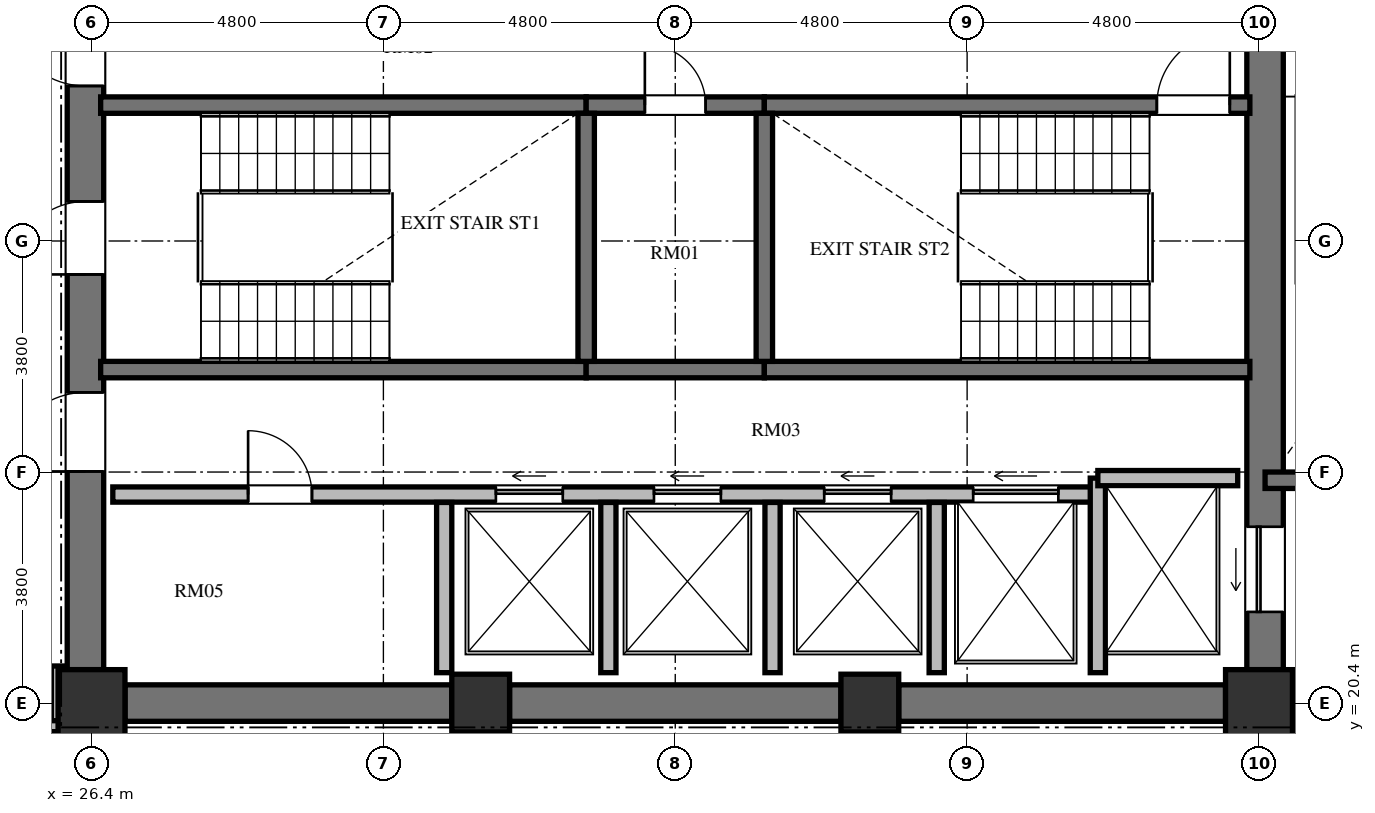
"""IFC4 building model, lengths in metres.
Left out: names, types, materials, properties, quantities, classifications, styles, units other than length and angle.
Written with IfcOpenShell. Run it as: python <this file> out.ifc"""

import sys

from ifc_helpers import new_model, si_unit, direction, frame, frame_2d, origin, origin_2d, place, context, subcontext, project, spatial, rectangle, extrude, element, fill, save


model = new_model("IFC4")
c1 = context("Model", 3, precision=1e-05, world=origin(), true_north=direction((0.0, 1.0)))
c2 = subcontext(c1, "Body", "Model", "MODEL_VIEW")
j1 = project(units=[si_unit("LENGTHUNIT", "METRE"), si_unit("PLANEANGLEUNIT", "RADIAN")], contexts=[c1])
p1 = place(None, origin())
s1 = spatial("IfcSite", under=j1, at=p1, CompositionType="ELEMENT")
p2 = place(p1, origin())
s2 = spatial("IfcBuilding", under=s1, at=p2, CompositionType="ELEMENT")
p3 = place(p2, frame((0.0, 0.0, 167.472)))
s3 = spatial("IfcBuildingStorey", under=s2, at=p3, CompositionType="ELEMENT", Elevation=167.472)
p4 = place(p3, frame((26.4, 20.4, 0.0), z_axis=(0.0, 0.0, 1.0), x_axis=(1.0, 0.0, 0.0)))
e1 = element("IfcColumn", 1, at=p4, inside=s3, PredefinedType="COLUMN", context=c2, shape_type="SweptSolid", body=[
    extrude(rectangle(XDim=1.1, YDim=1.1, at=origin_2d()), origin(), (0.0, 0.0, 1.0), 3.648),
])
for number, where, z_axis, x_axis in (
    (2, (32.8, 20.4, 0.0), (0.0, 0.0, 1.0), (1.0, 0.0, 0.0)),
    (3, (39.2, 20.4, 0.0), (0.0, 0.0, 1.0), (1.0, 0.0, 0.0)),
):
    element("IfcColumn", number, at=place(p3, frame(where, z_axis=z_axis, x_axis=x_axis)), inside=s3, PredefinedType="COLUMN", context=c2, shape_type="SweptSolid", body=[
        extrude(rectangle(XDim=0.95, YDim=0.95, at=origin_2d()), origin(), (0.0, 0.0, 1.0), 3.648),
    ])
p5 = place(p3, frame((45.6, 20.4, 0.0), z_axis=(0.0, 0.0, 1.0), x_axis=(1.0, 0.0, 0.0)))
e4 = element("IfcColumn", 4, at=p5, inside=s3, PredefinedType="COLUMN", context=c2, shape_type="SweptSolid", body=[
    extrude(rectangle(XDim=1.1, YDim=1.1, at=origin_2d()), origin(), (0.0, 0.0, 1.0), 3.648),
])
p6 = place(p3, frame((26.3, 20.95, 0.0), z_axis=(0.0, 0.0, 1.0), x_axis=(0.0, 1.0, 0.0)))
e5 = element("IfcWall", 5, at=p6, inside=s3, PredefinedType="SHEAR", context=c2, shape_type="SweptSolid", body=[
    extrude(rectangle(XDim=14.1, YDim=0.6, at=frame_2d((7.05, 0.0))), origin(), (0.0, 0.0, 1.0), 3.648),
])
p7 = place(p6, frame((6.5, 0.0, 0.0)))
e6 = element("IfcOpeningElement", 6, at=p7, cuts=e5, PredefinedType="OPENING", context=c2, shape_type="SweptSolid", body=[
    extrude(rectangle(XDim=1.2, YDim=2.15, at=frame_2d((0.6, 1.075))), frame((0.0, 0.31, 0.0), z_axis=(0.0, -1.0, 0.0), x_axis=(1.0, 0.0, 0.0)), (0.0, 0.0, 1.0), 0.62),
])
p8 = place(p6, frame((9.6, 0.0, 0.0)))
e7 = element("IfcOpeningElement", 7, at=p8, cuts=e5, PredefinedType="OPENING", context=c2, shape_type="SweptSolid", body=[
    extrude(rectangle(XDim=1.3, YDim=2.2, at=frame_2d((0.65, 1.1))), frame((0.0, 0.31, 0.0), z_axis=(0.0, -1.0, 0.0), x_axis=(1.0, 0.0, 0.0)), (0.0, 0.0, 1.0), 0.62),
])
p9 = place(p6, frame((3.26, 0.0, 0.0)))
e8 = element("IfcOpeningElement", 8, at=p9, cuts=e5, PredefinedType="OPENING", context=c2, shape_type="SweptSolid", body=[
    extrude(rectangle(XDim=1.3, YDim=2.2, at=frame_2d((0.65, 1.1))), frame((0.0, 0.31, 0.0), z_axis=(0.0, -1.0, 0.0), x_axis=(1.0, 0.0, 0.0)), (0.0, 0.0, 1.0), 0.62),
])
p10 = place(p3, frame((45.7, 20.95, 0.0), z_axis=(0.0, 0.0, 1.0), x_axis=(0.0, 1.0, 0.0)))
e9 = element("IfcWall", 9, at=p10, inside=s3, PredefinedType="SHEAR", context=c2, shape_type="SweptSolid", body=[
    extrude(rectangle(XDim=14.1, YDim=0.6, at=frame_2d((7.05, 0.0))), origin(), (0.0, 0.0, 1.0), 3.648),
])
p11 = place(p10, frame((11.75, 0.0, 0.0)))
e10 = element("IfcOpeningElement", 10, at=p11, cuts=e9, PredefinedType="OPENING", context=c2, shape_type="SweptSolid", body=[
    extrude(rectangle(XDim=1.4, YDim=2.3, at=frame_2d((0.7, 1.15))), frame((0.0, 0.31, 0.0), z_axis=(0.0, -1.0, 0.0), x_axis=(1.0, 0.0, 0.0)), (0.0, 0.0, 1.0), 0.62),
])
p12 = place(p10, frame((0.95, 0.0, 0.0)))
e11 = element("IfcOpeningElement", 11, at=p12, cuts=e9, PredefinedType="OPENING", context=c2, shape_type="SweptSolid", body=[
    extrude(rectangle(XDim=1.4, YDim=2.3, at=frame_2d((0.7, 1.15))), frame((0.0, 0.31, 0.0), z_axis=(0.0, -1.0, 0.0), x_axis=(1.0, 0.0, 0.0)), (0.0, 0.0, 1.0), 0.62),
])
p13 = place(p3, frame((26.95, 20.4, 0.0), z_axis=(0.0, 0.0, 1.0), x_axis=(1.0, 0.0, 0.0)))
e12 = element("IfcWall", 12, at=p13, inside=s3, PredefinedType="SHEAR", context=c2, shape_type="SweptSolid", body=[
    extrude(rectangle(XDim=5.375, YDim=0.6, at=frame_2d((2.688, 0.0))), origin(), (0.0, 0.0, 1.0), 3.648),
])
p14 = place(p3, frame((33.275, 20.4, 0.0), z_axis=(0.0, 0.0, 1.0), x_axis=(1.0, 0.0, 0.0)))
e13 = element("IfcWall", 13, at=p14, inside=s3, PredefinedType="SHEAR", context=c2, shape_type="SweptSolid", body=[
    extrude(rectangle(XDim=5.45, YDim=0.6, at=frame_2d((2.725, 0.0))), origin(), (0.0, 0.0, 1.0), 3.648),
])
p15 = place(p3, frame((39.675, 20.4, 0.0), z_axis=(0.0, 0.0, 1.0), x_axis=(1.0, 0.0, 0.0)))
e14 = element("IfcWall", 14, at=p15, inside=s3, PredefinedType="SHEAR", context=c2, shape_type="SweptSolid", body=[
    extrude(rectangle(XDim=5.375, YDim=0.6, at=frame_2d((2.688, 0.0))), origin(), (0.0, 0.0, 1.0), 3.648),
])
p16 = place(p3, frame((26.55, 30.235, 0.0), z_axis=(0.0, 0.0, 1.0), x_axis=(1.0, 0.0, 0.0)))
e15 = element("IfcWall", 15, at=p16, inside=s3, PredefinedType="SHEAR", context=c2, shape_type="SweptSolid", body=[
    extrude(rectangle(XDim=7.985, YDim=0.27, at=frame_2d((3.992, 0.0))), origin(), (0.0, 0.0, 1.0), 3.648),
])
p17 = place(p3, frame((34.535, 30.235, 0.0), z_axis=(0.0, 0.0, 1.0), x_axis=(1.0, 0.0, 0.0)))
e16 = element("IfcWall", 16, at=p17, inside=s3, PredefinedType="SHEAR", context=c2, shape_type="SweptSolid", body=[
    extrude(rectangle(XDim=2.93, YDim=0.27, at=frame_2d((1.465, 0.0))), origin(), (0.0, 0.0, 1.0), 3.648),
])
p18 = place(p17, frame((0.965, 0.0, 0.0)))
e17 = element("IfcOpeningElement", 17, at=p18, cuts=e16, PredefinedType="OPENING", context=c2, shape_type="SweptSolid", body=[
    extrude(rectangle(XDim=1.0, YDim=2.1, at=frame_2d((0.5, 1.05))), frame((0.0, 0.145, 0.0), z_axis=(0.0, -1.0, 0.0), x_axis=(1.0, 0.0, 0.0)), (0.0, 0.0, 1.0), 0.29),
])
p19 = place(p3, frame((37.465, 30.235, 0.0), z_axis=(0.0, 0.0, 1.0), x_axis=(1.0, 0.0, 0.0)))
e18 = element("IfcWall", 18, at=p19, inside=s3, PredefinedType="SHEAR", context=c2, shape_type="SweptSolid", body=[
    extrude(rectangle(XDim=7.985, YDim=0.27, at=frame_2d((3.992, 0.0))), origin(), (0.0, 0.0, 1.0), 3.648),
])
p20 = place(p19, frame((6.455, 0.0, 0.0)))
e19 = element("IfcOpeningElement", 19, at=p20, cuts=e18, PredefinedType="OPENING", context=c2, shape_type="SweptSolid", body=[
    extrude(rectangle(XDim=1.2, YDim=2.15, at=frame_2d((0.6, 1.075))), frame((0.0, 0.145, 0.0), z_axis=(0.0, -1.0, 0.0), x_axis=(1.0, 0.0, 0.0)), (0.0, 0.0, 1.0), 0.29),
])
p21 = place(p3, frame((26.55, 25.885, 0.0), z_axis=(0.0, 0.0, 1.0), x_axis=(1.0, 0.0, 0.0)))
e20 = element("IfcWall", 20, at=p21, inside=s3, PredefinedType="SHEAR", context=c2, shape_type="SweptSolid", body=[
    extrude(rectangle(XDim=7.985, YDim=0.27, at=frame_2d((3.992, 0.0))), origin(), (0.0, 0.0, 1.0), 3.648),
])
p22 = place(p3, frame((34.535, 25.885, 0.0), z_axis=(0.0, 0.0, 1.0), x_axis=(1.0, 0.0, 0.0)))
e21 = element("IfcWall", 21, at=p22, inside=s3, PredefinedType="SHEAR", context=c2, shape_type="SweptSolid", body=[
    extrude(rectangle(XDim=2.93, YDim=0.27, at=frame_2d((1.465, 0.0))), origin(), (0.0, 0.0, 1.0), 3.648),
])
p23 = place(p3, frame((37.465, 25.885, 0.0), z_axis=(0.0, 0.0, 1.0), x_axis=(1.0, 0.0, 0.0)))
e22 = element("IfcWall", 22, at=p23, inside=s3, PredefinedType="SHEAR", context=c2, shape_type="SweptSolid", body=[
    extrude(rectangle(XDim=7.985, YDim=0.27, at=frame_2d((3.992, 0.0))), origin(), (0.0, 0.0, 1.0), 3.648),
])
for number, where, z_axis, x_axis in (
    (23, (34.535, 26.02, 0.0), (0.0, 0.0, 1.0), (0.0, 1.0, 0.0)),
    (24, (37.465, 26.02, 0.0), (0.0, 0.0, 1.0), (0.0, 1.0, 0.0)),
):
    element("IfcWall", number, at=place(p3, frame(where, z_axis=z_axis, x_axis=x_axis)), inside=s3, PredefinedType="SHEAR", context=c2, shape_type="SweptSolid", body=[
        extrude(rectangle(XDim=4.08, YDim=0.27, at=frame_2d((2.04, 0.0))), origin(), (0.0, 0.0, 1.0), 3.648),
    ])
p24 = place(p3, frame((26.75, 23.83, 0.0), z_axis=(0.0, 0.0, 1.0), x_axis=(1.0, 0.0, 0.0)))
e25 = element("IfcWall", 25, at=p24, inside=s3, PredefinedType="SOLIDWALL", context=c2, shape_type="SweptSolid", body=[
    extrude(rectangle(XDim=16.2, YDim=0.25, at=frame_2d((8.1, 0.0))), origin(), (0.0, 0.0, 1.0), 3.428),
])
p25 = place(p24, frame((2.225, 0.0, 0.0)))
e26 = element("IfcOpeningElement", 26, at=p25, cuts=e25, PredefinedType="OPENING", context=c2, shape_type="SweptSolid", body=[
    extrude(rectangle(XDim=1.05, YDim=2.15, at=frame_2d((0.525, 1.075))), frame((0.0, 0.135, 0.0), z_axis=(0.0, -1.0, 0.0), x_axis=(1.0, 0.0, 0.0)), (0.0, 0.0, 1.0), 0.27),
])
p26 = place(p24, frame((6.3, 0.0, 0.0)))
e27 = element("IfcOpeningElement", 27, at=p26, cuts=e25, PredefinedType="OPENING", context=c2, shape_type="SweptSolid", body=[
    extrude(rectangle(XDim=1.1, YDim=2.2, at=frame_2d((0.55, 1.1))), frame((0.0, 0.135, 0.0), z_axis=(0.0, -1.0, 0.0), x_axis=(1.0, 0.0, 0.0)), (0.0, 0.0, 1.0), 0.27),
])
p27 = place(p24, frame((8.9, 0.0, 0.0)))
e28 = element("IfcOpeningElement", 28, at=p27, cuts=e25, PredefinedType="OPENING", context=c2, shape_type="SweptSolid", body=[
    extrude(rectangle(XDim=1.1, YDim=2.2, at=frame_2d((0.55, 1.1))), frame((0.0, 0.135, 0.0), z_axis=(0.0, -1.0, 0.0), x_axis=(1.0, 0.0, 0.0)), (0.0, 0.0, 1.0), 0.27),
])
p28 = place(p24, frame((11.7, 0.0, 0.0)))
e29 = element("IfcOpeningElement", 29, at=p28, cuts=e25, PredefinedType="OPENING", context=c2, shape_type="SweptSolid", body=[
    extrude(rectangle(XDim=1.1, YDim=2.2, at=frame_2d((0.55, 1.1))), frame((0.0, 0.135, 0.0), z_axis=(0.0, -1.0, 0.0), x_axis=(1.0, 0.0, 0.0)), (0.0, 0.0, 1.0), 0.27),
])
p29 = place(p24, frame((14.15, 0.0, 0.0)))
e30 = element("IfcOpeningElement", 30, at=p29, cuts=e25, PredefinedType="OPENING", context=c2, shape_type="SweptSolid", body=[
    extrude(rectangle(XDim=1.4, YDim=2.3, at=frame_2d((0.7, 1.15))), frame((0.0, 0.135, 0.0), z_axis=(0.0, -1.0, 0.0), x_axis=(1.0, 0.0, 0.0)), (0.0, 0.0, 1.0), 0.27),
])
p30 = place(p3, frame((42.95, 20.9, 0.0), z_axis=(0.0, 0.0, 1.0), x_axis=(0.0, 1.0, 0.0)))
e31 = element("IfcWall", 31, at=p30, inside=s3, PredefinedType="SOLIDWALL", context=c2, shape_type="SweptSolid", body=[
    extrude(rectangle(XDim=3.2, YDim=0.25, at=frame_2d((1.6, 0.0))), origin(), (0.0, 0.0, 1.0), 3.428),
])
p31 = place(p3, frame((42.95, 24.1, 0.0), z_axis=(0.0, 0.0, 1.0), x_axis=(1.0, 0.0, 0.0)))
e32 = element("IfcWall", 32, at=p31, inside=s3, PredefinedType="SOLIDWALL", context=c2, shape_type="SweptSolid", body=[
    extrude(rectangle(XDim=2.3, YDim=0.25, at=frame_2d((1.15, 0.0))), origin(), (0.0, 0.0, 1.0), 3.428),
])
for number, where, z_axis, x_axis in (
    (33, (32.2, 20.9, 0.0), (0.0, 0.0, 1.0), (0.0, 1.0, 0.0)),
    (34, (34.9, 20.9, 0.0), (0.0, 0.0, 1.0), (0.0, 1.0, 0.0)),
    (35, (37.6, 20.9, 0.0), (0.0, 0.0, 1.0), (0.0, 1.0, 0.0)),
    (36, (40.3, 20.9, 0.0), (0.0, 0.0, 1.0), (0.0, 1.0, 0.0)),
):
    element("IfcWall", number, at=place(p3, frame(where, z_axis=z_axis, x_axis=x_axis)), inside=s3, PredefinedType="SOLIDWALL", context=c2, shape_type="SweptSolid", body=[
        extrude(rectangle(XDim=2.8, YDim=0.25, at=frame_2d((1.4, 0.0))), origin(), (0.0, 0.0, 1.0), 3.428),
    ])
p32 = place(p3, frame((45.7, 24.065, 0.0), z_axis=(0.0, 0.0, 1.0), x_axis=(1.0, 0.0, 0.0)))
e37 = element("IfcWall", 37, at=p32, inside=s3, PredefinedType="SHEAR", context=c2, shape_type="SweptSolid", body=[
    extrude(rectangle(XDim=4.715, YDim=0.27, at=frame_2d((2.357, 0.0))), origin(), (0.0, 0.0, 1.0), 3.648),
])
p33 = place(p3, frame((45.7, 20.02, 0.0), z_axis=(0.0, 0.0, 1.0), x_axis=(1.0, 0.0, 0.0)))
e38 = element("IfcWall", 38, at=p33, inside=s3, PredefinedType="SOLIDWALL", context=c2, shape_type="SweptSolid", body=[
    extrude(rectangle(XDim=4.715, YDim=0.25, at=frame_2d((2.357, 0.0))), origin(), (0.0, 0.0, 1.0), 3.428),
])
p34 = place(p3, frame((25.83, 21.01, 0.0), z_axis=(0.0, 0.0, 1.0), x_axis=(0.0, -1.0, 0.0)))
e39 = element("IfcWall", 39, at=p34, inside=s3, PredefinedType="PARTITIONING", context=c2, shape_type="SweptSolid", body=[
    extrude(rectangle(XDim=1.03, YDim=0.18, at=frame_2d((0.515, 0.0))), origin(), (0.0, 0.0, 1.0), 3.428),
])
p35 = place(p3, frame((25.87, 20.02, 0.0), z_axis=(0.0, 0.0, 1.0), x_axis=(-1.0, 0.0, 0.0)))
e40 = element("IfcWall", 40, at=p35, inside=s3, PredefinedType="PARTITIONING", context=c2, shape_type="SweptSolid", body=[
    extrude(rectangle(XDim=2.56, YDim=0.18, at=frame_2d((1.28, 0.0))), origin(), (0.0, 0.0, 1.0), 3.428),
])
p36 = place(p7, origin())
e41 = element("IfcDoor", 41, at=p36, inside=s3, OperationType="SINGLE_SWING_LEFT", PredefinedType="DOOR", context=c2, shape_type="SweptSolid", body=[
    extrude(rectangle(XDim=1.2, YDim=2.15, at=frame_2d((0.6, 1.075))), frame((0.0, 0.025, 0.0), z_axis=(0.0, -1.0, 0.0), x_axis=(1.0, 0.0, 0.0)), (0.0, 0.0, 1.0), 0.05),
])
fill(e6, e41)
p37 = place(p20, origin())
e42 = element("IfcDoor", 42, at=p37, inside=s3, OperationType="SINGLE_SWING_RIGHT", PredefinedType="DOOR", context=c2, shape_type="SweptSolid", body=[
    extrude(rectangle(XDim=1.2, YDim=2.15, at=frame_2d((0.6, 1.075))), frame((0.0, 0.025, 0.0), z_axis=(0.0, -1.0, 0.0), x_axis=(1.0, 0.0, 0.0)), (0.0, 0.0, 1.0), 0.05),
])
fill(e19, e42)
p38 = place(p18, origin())
e43 = element("IfcDoor", 43, at=p38, inside=s3, OperationType="SINGLE_SWING_LEFT", PredefinedType="DOOR", context=c2, shape_type="SweptSolid", body=[
    extrude(rectangle(XDim=1.0, YDim=2.1, at=frame_2d((0.5, 1.05))), frame((0.0, 0.025, 0.0), z_axis=(0.0, -1.0, 0.0), x_axis=(1.0, 0.0, 0.0)), (0.0, 0.0, 1.0), 0.05),
])
fill(e17, e43)
p39 = place(p8, origin())
e44 = element("IfcDoor", 44, at=p39, inside=s3, OperationType="SINGLE_SWING_RIGHT", PredefinedType="DOOR", context=c2, shape_type="SweptSolid", body=[
    extrude(rectangle(XDim=1.3, YDim=2.2, at=frame_2d((0.65, 1.1))), frame((0.0, 0.025, 0.0), z_axis=(0.0, -1.0, 0.0), x_axis=(1.0, 0.0, 0.0)), (0.0, 0.0, 1.0), 0.05),
])
fill(e7, e44)
p40 = place(p9, origin())
e45 = element("IfcDoor", 45, at=p40, inside=s3, OperationType="SINGLE_SWING_LEFT", PredefinedType="DOOR", context=c2, shape_type="SweptSolid", body=[
    extrude(rectangle(XDim=1.3, YDim=2.2, at=frame_2d((0.65, 1.1))), frame((0.0, 0.025, 0.0), z_axis=(0.0, -1.0, 0.0), x_axis=(1.0, 0.0, 0.0)), (0.0, 0.0, 1.0), 0.05),
])
fill(e8, e45)
p41 = place(p25, origin())
e46 = element("IfcDoor", 46, at=p41, inside=s3, OperationType="SINGLE_SWING_LEFT", PredefinedType="DOOR", context=c2, shape_type="SweptSolid", body=[
    extrude(rectangle(XDim=1.05, YDim=2.15, at=frame_2d((0.525, 1.075))), frame((0.0, 0.025, 0.0), z_axis=(0.0, -1.0, 0.0), x_axis=(1.0, 0.0, 0.0)), (0.0, 0.0, 1.0), 0.05),
])
fill(e26, e46)
p42 = place(p26, origin())
e47 = element("IfcDoor", 47, at=p42, inside=s3, OperationType="SLIDING_TO_LEFT", PredefinedType="DOOR", context=c2, shape_type="SweptSolid", body=[
    extrude(rectangle(XDim=1.1, YDim=2.2, at=frame_2d((0.55, 1.1))), frame((0.0, 0.025, 0.0), z_axis=(0.0, -1.0, 0.0), x_axis=(1.0, 0.0, 0.0)), (0.0, 0.0, 1.0), 0.05),
])
fill(e27, e47)
p43 = place(p27, origin())
e48 = element("IfcDoor", 48, at=p43, inside=s3, OperationType="SLIDING_TO_LEFT", PredefinedType="DOOR", context=c2, shape_type="SweptSolid", body=[
    extrude(rectangle(XDim=1.1, YDim=2.2, at=frame_2d((0.55, 1.1))), frame((0.0, 0.025, 0.0), z_axis=(0.0, -1.0, 0.0), x_axis=(1.0, 0.0, 0.0)), (0.0, 0.0, 1.0), 0.05),
])
fill(e28, e48)
p44 = place(p28, origin())
e49 = element("IfcDoor", 49, at=p44, inside=s3, OperationType="SLIDING_TO_LEFT", PredefinedType="DOOR", context=c2, shape_type="SweptSolid", body=[
    extrude(rectangle(XDim=1.1, YDim=2.2, at=frame_2d((0.55, 1.1))), frame((0.0, 0.025, 0.0), z_axis=(0.0, -1.0, 0.0), x_axis=(1.0, 0.0, 0.0)), (0.0, 0.0, 1.0), 0.05),
])
fill(e29, e49)
p45 = place(p12, origin())
e50 = element("IfcDoor", 50, at=p45, inside=s3, OperationType="SLIDING_TO_LEFT", PredefinedType="DOOR", context=c2, shape_type="SweptSolid", body=[
    extrude(rectangle(XDim=1.4, YDim=2.3, at=frame_2d((0.7, 1.15))), frame((0.0, 0.025, 0.0), z_axis=(0.0, -1.0, 0.0), x_axis=(1.0, 0.0, 0.0)), (0.0, 0.0, 1.0), 0.05),
])
fill(e11, e50)
p46 = place(p29, origin())
e51 = element("IfcDoor", 51, at=p46, inside=s3, OperationType="SLIDING_TO_LEFT", PredefinedType="DOOR", context=c2, shape_type="SweptSolid", body=[
    extrude(rectangle(XDim=1.4, YDim=2.3, at=frame_2d((0.7, 1.15))), frame((0.0, 0.025, 0.0), z_axis=(0.0, -1.0, 0.0), x_axis=(1.0, 0.0, 0.0)), (0.0, 0.0, 1.0), 0.05),
])
fill(e30, e51)
save(model, sys.argv[1])
